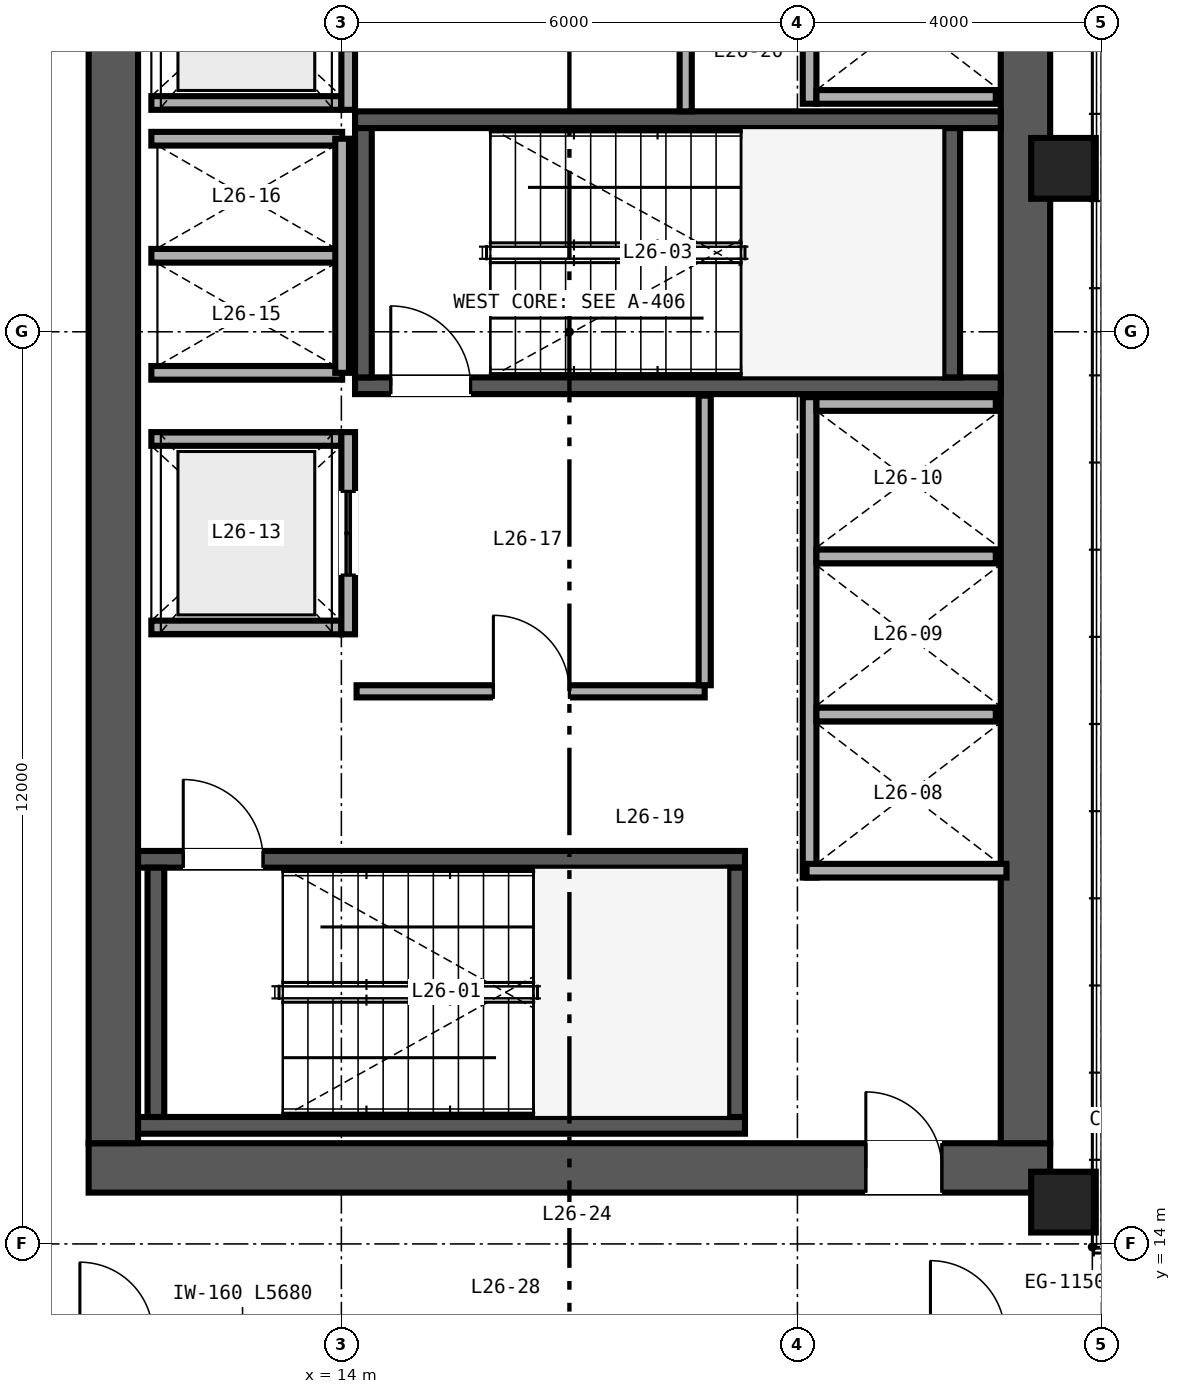
"""IFC4 building model, lengths in metres.
Left out: names, types, materials, properties, quantities, classifications, styles, units other than length and angle.
Written with IfcOpenShell. Run it as: python <this file> out.ifc"""

import sys

from ifc_helpers import new_model, si_unit, direction, frame, frame_2d, origin, origin_2d, place, context, subcontext, project, spatial, rectangle, hollow_rectangle, extrude, source, transform, mapped, element, fill, save


model = new_model("IFC4")
c1 = context("Model", 3, precision=1e-05, world=origin(), true_north=direction((0.0, 1.0)))
c2 = subcontext(c1, "Body", "Model", "MODEL_VIEW")
j1 = project(units=[si_unit("LENGTHUNIT", "METRE"), si_unit("PLANEANGLEUNIT", "RADIAN")], contexts=[c1])
p1 = place(None, origin())
s1 = spatial("IfcSite", under=j1, at=p1, CompositionType="ELEMENT")
p2 = place(p1, origin())
s2 = spatial("IfcBuilding", under=s1, at=p2, CompositionType="ELEMENT")
p3 = place(p2, frame((0.0, 0.0, 108.0)))
s3 = spatial("IfcBuildingStorey", under=s2, at=p3, CompositionType="ELEMENT", Elevation=108.0)
p4 = place(p3, frame((10.675, 15.0, 0.0), z_axis=(0.0, 0.0, 1.0), x_axis=(1.0, 0.0, 0.0)))
e1 = element("IfcWall", 1, at=p4, inside=s3, PredefinedType="SHEAR", context=c2, shape_type="SweptSolid", body=[
    extrude(rectangle(XDim=12.65, YDim=0.65, at=frame_2d((6.325, 0.0))), origin(), (0.0, 0.0, 1.0), 3.36),
])
p5 = place(p4, frame((10.225, 0.0, 0.0)))
e2 = element("IfcOpeningElement", 2, at=p5, cuts=e1, PredefinedType="OPENING", context=c2, shape_type="SweptSolid", body=[
    extrude(rectangle(XDim=1.0, YDim=2.15, at=frame_2d((0.5, 1.075))), frame((0.0, 0.335, 0.0), z_axis=(0.0, -1.0, 0.0), x_axis=(1.0, 0.0, 0.0)), (0.0, 0.0, 1.0), 0.67),
])
for number, where, z_axis, x_axis in (
    (3, (11.0, 15.325, 0.0), (0.0, 0.0, 1.0), (0.0, 1.0, 0.0)),
    (4, (23.0, 15.325, 0.0), (0.0, 0.0, 1.0), (0.0, 1.0, 0.0)),
):
    element("IfcWall", number, at=place(p3, frame(where, z_axis=z_axis, x_axis=x_axis)), inside=s3, PredefinedType="SHEAR", context=c2, shape_type="SweptSolid", body=[
        extrude(rectangle(XDim=21.35, YDim=0.65, at=frame_2d((10.675, 0.0))), origin(), (0.0, 0.0, 1.0), 3.36),
    ])
p6 = place(p3, frame((11.325, 15.56, 0.0), z_axis=(0.0, 0.0, 1.0), x_axis=(1.0, 0.0, 0.0)))
e5 = element("IfcWall", 5, at=p6, inside=s3, PredefinedType="SHEAR", context=c2, shape_type="SweptSolid", body=[
    extrude(rectangle(XDim=7.985, YDim=0.22, at=frame_2d((3.993, 0.0))), origin(), (0.0, 0.0, 1.0), 3.4),
])
p7 = place(p3, frame((11.325, 19.06, 0.0), z_axis=(0.0, 0.0, 1.0), x_axis=(1.0, 0.0, 0.0)))
e6 = element("IfcWall", 6, at=p7, inside=s3, PredefinedType="SHEAR", context=c2, shape_type="SweptSolid", body=[
    extrude(rectangle(XDim=7.985, YDim=0.22, at=frame_2d((3.993, 0.0))), origin(), (0.0, 0.0, 1.0), 3.4),
])
p8 = place(p7, frame((0.595, 0.0, 0.0)))
e7 = element("IfcOpeningElement", 7, at=p8, cuts=e6, PredefinedType="OPENING", context=c2, shape_type="SweptSolid", body=[
    extrude(rectangle(XDim=1.05, YDim=2.15, at=frame_2d((0.525, 1.075))), frame((0.0, 0.12, 0.0), z_axis=(0.0, -1.0, 0.0), x_axis=(1.0, 0.0, 0.0)), (0.0, 0.0, 1.0), 0.24),
])
for number, where, z_axis, x_axis in (
    (8, (11.56, 15.67, 0.0), (0.0, 0.0, 1.0), (0.0, 1.0, 0.0)),
    (9, (19.2, 15.67, 0.0), (0.0, 0.0, 1.0), (0.0, 1.0, 0.0)),
):
    element("IfcWall", number, at=place(p3, frame(where, z_axis=z_axis, x_axis=x_axis)), inside=s3, PredefinedType="SHEAR", context=c2, shape_type="SweptSolid", body=[
        extrude(rectangle(XDim=3.28, YDim=0.22, at=frame_2d((1.64, 0.0))), origin(), (0.0, 0.0, 1.0), 3.4),
    ])
p9 = place(p3, frame((14.18, 25.29, 0.0), z_axis=(0.0, 0.0, 1.0), x_axis=(1.0, 0.0, 0.0)))
e10 = element("IfcWall", 10, at=p9, inside=s3, PredefinedType="SHEAR", context=c2, shape_type="SweptSolid", body=[
    extrude(rectangle(XDim=8.495, YDim=0.22, at=frame_2d((4.248, 0.0))), origin(), (0.0, 0.0, 1.0), 3.4),
])
p10 = place(p9, frame((0.47, 0.0, 0.0)))
e11 = element("IfcOpeningElement", 11, at=p10, cuts=e10, PredefinedType="OPENING", context=c2, shape_type="SweptSolid", body=[
    extrude(rectangle(XDim=1.05, YDim=2.15, at=frame_2d((0.525, 1.075))), frame((0.0, 0.12, 0.0), z_axis=(0.0, -1.0, 0.0), x_axis=(1.0, 0.0, 0.0)), (0.0, 0.0, 1.0), 0.24),
])
p11 = place(p3, frame((14.18, 28.79, 0.0), z_axis=(0.0, 0.0, 1.0), x_axis=(1.0, 0.0, 0.0)))
e12 = element("IfcWall", 12, at=p11, inside=s3, PredefinedType="SHEAR", context=c2, shape_type="SweptSolid", body=[
    extrude(rectangle(XDim=8.495, YDim=0.22, at=frame_2d((4.248, 0.0))), origin(), (0.0, 0.0, 1.0), 3.4),
])
for number, where, z_axis, x_axis in (
    (13, (14.29, 25.4, 0.0), (0.0, 0.0, 1.0), (0.0, 1.0, 0.0)),
    (14, (22.03, 25.4, 0.0), (0.0, 0.0, 1.0), (0.0, 1.0, 0.0)),
):
    element("IfcWall", number, at=place(p3, frame(where, z_axis=z_axis, x_axis=x_axis)), inside=s3, PredefinedType="SHEAR", context=c2, shape_type="SweptSolid", body=[
        extrude(rectangle(XDim=3.28, YDim=0.22, at=frame_2d((1.64, 0.0))), origin(), (0.0, 0.0, 1.0), 3.4),
    ])
m1 = source(origin(), c2, "Body", "SweptSolid", [
    extrude(hollow_rectangle(XDim=0.85, YDim=0.8, WallThickness=0.032, at=origin_2d()), origin(), (0.0, 0.0, 1.0), 3.36),
])
for number, where, z_axis, x_axis in (
    (15, (23.5, 14.55, 0.0), (0.0, 0.0, 1.0), (1.0, 0.0, 0.0)),
    (16, (23.5, 28.15, 0.0), (0.0, 0.0, 1.0), (1.0, 0.0, 0.0)),
):
    element("IfcColumn", number, at=place(p3, frame(where, z_axis=z_axis, x_axis=x_axis)), inside=s3, PredefinedType="COLUMN", context=c2, shape_type="MappedRepresentation", body=[
        mapped(m1, transform((0.0, 0.0, 0.0), scale=1.0)),
    ])
p12 = place(p3, frame((20.16, 18.82, 0.0), z_axis=(0.0, 0.0, 1.0), x_axis=(0.0, 1.0, 0.0)))
e17 = element("IfcWall", 17, at=p12, inside=s3, PredefinedType="SOLIDWALL", context=c2, shape_type="SweptSolid", body=[
    extrude(rectangle(XDim=6.32, YDim=0.18, at=frame_2d((3.16, 0.0))), origin(), (0.0, 0.0, 1.0), 2.36),
])
p13 = place(p3, frame((20.12, 18.91, 0.0), z_axis=(0.0, 0.0, 1.0), x_axis=(1.0, 0.0, 0.0)))
e18 = element("IfcWall", 18, at=p13, inside=s3, PredefinedType="SOLIDWALL", context=c2, shape_type="SweptSolid", body=[
    extrude(rectangle(XDim=2.63, YDim=0.18, at=frame_2d((1.315, 0.0))), origin(), (0.0, 0.0, 1.0), 3.36),
])
p14 = place(p3, frame((20.25, 25.05, 0.0), z_axis=(0.0, 0.0, 1.0), x_axis=(1.0, 0.0, 0.0)))
e19 = element("IfcWall", 19, at=p14, inside=s3, PredefinedType="SOLIDWALL", context=c2, shape_type="SweptSolid", body=[
    extrude(rectangle(XDim=2.36, YDim=0.18, at=frame_2d((1.18, 0.0))), origin(), (0.0, 0.0, 1.0), 3.36),
])
p15 = place(p3, frame((20.25, 20.965, 0.0), z_axis=(0.0, 0.0, 1.0), x_axis=(1.0, 0.0, 0.0)))
e20 = element("IfcWall", 20, at=p15, inside=s3, PredefinedType="SOLIDWALL", context=c2, shape_type="SweptSolid", body=[
    extrude(rectangle(XDim=2.36, YDim=0.18, at=frame_2d((1.18, 0.0))), origin(), (0.0, 0.0, 1.0), 2.36),
])
p16 = place(p3, frame((20.25, 23.045, 0.0), z_axis=(0.0, 0.0, 1.0), x_axis=(1.0, 0.0, 0.0)))
e21 = element("IfcWall", 21, at=p16, inside=s3, PredefinedType="SOLIDWALL", context=c2, shape_type="SweptSolid", body=[
    extrude(rectangle(XDim=2.36, YDim=0.18, at=frame_2d((1.18, 0.0))), origin(), (0.0, 0.0, 1.0), 3.36),
])
p17 = place(p3, frame((20.16, 29.0, 0.0), z_axis=(0.0, 0.0, 1.0), x_axis=(0.0, 1.0, 0.0)))
e22 = element("IfcWall", 22, at=p17, inside=s3, PredefinedType="SOLIDWALL", context=c2, shape_type="SweptSolid", body=[
    extrude(rectangle(XDim=4.29, YDim=0.18, at=frame_2d((2.145, 0.0))), origin(), (0.0, 0.0, 1.0), 3.36),
])
p18 = place(p3, frame((20.25, 29.09, 0.0), z_axis=(0.0, 0.0, 1.0), x_axis=(1.0, 0.0, 0.0)))
e23 = element("IfcWall", 23, at=p18, inside=s3, PredefinedType="SOLIDWALL", context=c2, shape_type="SweptSolid", body=[
    extrude(rectangle(XDim=2.36, YDim=0.18, at=frame_2d((1.18, 0.0))), origin(), (0.0, 0.0, 1.0), 3.36),
])
for number, where, z_axis, x_axis in (
    (24, (11.5, 22.11, 0.0), (0.0, 0.0, 1.0), (1.0, 0.0, 0.0)),
    (25, (11.5, 24.59, 0.0), (0.0, 0.0, 1.0), (1.0, 0.0, 0.0)),
):
    element("IfcWall", number, at=place(p3, frame(where, z_axis=z_axis, x_axis=x_axis)), inside=s3, PredefinedType="SOLIDWALL", context=c2, shape_type="SweptSolid", body=[
        extrude(rectangle(XDim=2.5, YDim=0.18, at=frame_2d((1.25, 0.0))), origin(), (0.0, 0.0, 1.0), 3.36),
    ])
p19 = place(p3, frame((14.09, 22.02, 0.0), z_axis=(0.0, 0.0, 1.0), x_axis=(0.0, 1.0, 0.0)))
e26 = element("IfcWall", 26, at=p19, inside=s3, PredefinedType="SOLIDWALL", context=c2, shape_type="SweptSolid", body=[
    extrude(rectangle(XDim=2.66, YDim=0.18, at=frame_2d((1.33, 0.0))), origin(), (0.0, 0.0, 1.0), 3.36),
])
p20 = place(p19, frame((0.78, 0.0, 0.0)))
e27 = element("IfcOpeningElement", 27, at=p20, cuts=e26, PredefinedType="OPENING", context=c2, shape_type="SweptSolid", body=[
    extrude(rectangle(XDim=1.1, YDim=2.2, at=frame_2d((0.55, 1.1))), frame((0.0, 0.1, 0.0), z_axis=(0.0, -1.0, 0.0), x_axis=(1.0, 0.0, 0.0)), (0.0, 0.0, 1.0), 0.2),
])
p21 = place(p3, frame((11.5, 29.01, 0.0), z_axis=(0.0, 0.0, 1.0), x_axis=(1.0, 0.0, 0.0)))
e28 = element("IfcWall", 28, at=p21, inside=s3, PredefinedType="SOLIDWALL", context=c2, shape_type="SweptSolid", body=[
    extrude(rectangle(XDim=2.5, YDim=0.18, at=frame_2d((1.25, 0.0))), origin(), (0.0, 0.0, 1.0), 3.36),
])
p22 = place(p3, frame((14.09, 28.92, 0.0), z_axis=(0.0, 0.0, 1.0), x_axis=(0.0, 1.0, 0.0)))
e29 = element("IfcWall", 29, at=p22, inside=s3, PredefinedType="SOLIDWALL", context=c2, shape_type="SweptSolid", body=[
    extrude(rectangle(XDim=2.66, YDim=0.18, at=frame_2d((1.33, 0.0))), origin(), (0.0, 0.0, 1.0), 3.36),
])
p23 = place(p22, frame((0.78, 0.0, 0.0)))
e30 = element("IfcOpeningElement", 30, at=p23, cuts=e29, PredefinedType="OPENING", context=c2, shape_type="SweptSolid", body=[
    extrude(rectangle(XDim=1.1, YDim=2.2, at=frame_2d((0.55, 1.1))), frame((0.0, 0.1, 0.0), z_axis=(0.0, -1.0, 0.0), x_axis=(1.0, 0.0, 0.0)), (0.0, 0.0, 1.0), 0.2),
])
for number, where, z_axis, x_axis in (
    (31, (11.5, 25.46, 0.0), (0.0, 0.0, 1.0), (1.0, 0.0, 0.0)),
    (32, (11.5, 27.0, 0.0), (0.0, 0.0, 1.0), (1.0, 0.0, 0.0)),
    (33, (11.5, 28.54, 0.0), (0.0, 0.0, 1.0), (1.0, 0.0, 0.0)),
):
    element("IfcWall", number, at=place(p3, frame(where, z_axis=z_axis, x_axis=x_axis)), inside=s3, PredefinedType="SOLIDWALL", context=c2, shape_type="SweptSolid", body=[
        extrude(rectangle(XDim=2.51, YDim=0.18, at=frame_2d((1.255, 0.0))), origin(), (0.0, 0.0, 1.0), 3.36),
    ])
p24 = place(p3, frame((14.01, 25.46, 0.0), z_axis=(0.0, 0.0, 1.0), x_axis=(0.0, 1.0, 0.0)))
e34 = element("IfcWall", 34, at=p24, inside=s3, PredefinedType="SOLIDWALL", context=c2, shape_type="SweptSolid", body=[
    extrude(rectangle(XDim=3.08, YDim=0.18, at=frame_2d((1.54, 0.0))), origin(), (0.0, 0.0, 1.0), 3.36),
])
p25 = place(p3, frame((14.2, 21.27, 0.0), z_axis=(0.0, 0.0, 1.0), x_axis=(1.0, 0.0, 0.0)))
e35 = element("IfcWall", 35, at=p25, inside=s3, PredefinedType="PARTITIONING", context=c2, shape_type="SweptSolid", body=[
    extrude(rectangle(XDim=4.58, YDim=0.16, at=frame_2d((2.29, 0.0))), origin(), (0.0, 0.0, 1.0), 3.36),
])
p26 = place(p25, frame((1.8, 0.0, 0.0)))
e36 = element("IfcOpeningElement", 36, at=p26, cuts=e35, PredefinedType="OPENING", context=c2, shape_type="SweptSolid", body=[
    extrude(rectangle(XDim=1.0, YDim=2.15, at=frame_2d((0.5, 1.075))), frame((0.0, 0.09, 0.0), z_axis=(0.0, -1.0, 0.0), x_axis=(1.0, 0.0, 0.0)), (0.0, 0.0, 1.0), 0.18),
])
p27 = place(p3, frame((18.78, 21.35, 0.0), z_axis=(0.0, 0.0, 1.0), x_axis=(0.0, 1.0, 0.0)))
e37 = element("IfcWall", 37, at=p27, inside=s3, PredefinedType="PARTITIONING", context=c2, shape_type="SweptSolid", body=[
    extrude(rectangle(XDim=3.81, YDim=0.16, at=frame_2d((1.905, 0.0))), origin(), (0.0, 0.0, 1.0), 3.36),
])
p28 = place(p3, frame((18.53, 28.9, 0.0), z_axis=(0.0, 0.0, 1.0), x_axis=(0.0, 1.0, 0.0)))
e38 = element("IfcWall", 38, at=p28, inside=s3, PredefinedType="PARTITIONING", context=c2, shape_type="SweptSolid", body=[
    extrude(rectangle(XDim=3.9, YDim=0.16, at=frame_2d((1.95, 0.0))), origin(), (0.0, 0.0, 1.0), 3.36),
])
p29 = place(p28, frame((1.5, 0.0, 0.0)))
e39 = element("IfcOpeningElement", 39, at=p29, cuts=e38, PredefinedType="OPENING", context=c2, shape_type="SweptSolid", body=[
    extrude(rectangle(XDim=1.0, YDim=2.15, at=frame_2d((0.5, 1.075))), frame((0.0, 0.09, 0.0), z_axis=(0.0, -1.0, 0.0), x_axis=(1.0, 0.0, 0.0)), (0.0, 0.0, 1.0), 0.18),
])
m2 = source(origin(), c2, "Body", "SweptSolid", [
    extrude(rectangle(XDim=1.05, YDim=2.15, at=frame_2d((0.525, 1.075))), frame((0.0, 0.025, 0.0), z_axis=(0.0, -1.0, 0.0), x_axis=(1.0, 0.0, 0.0)), (0.0, 0.0, 1.0), 0.05),
])
p30 = place(p8, origin())
e40 = element("IfcDoor", 40, at=p30, inside=s3, OperationType="SINGLE_SWING_LEFT", PredefinedType="DOOR", context=c2, shape_type="MappedRepresentation", body=[
    mapped(m2, transform((0.0, 0.0, 0.0), scale=1.0)),
])
fill(e7, e40)
p31 = place(p10, origin())
e41 = element("IfcDoor", 41, at=p31, inside=s3, OperationType="SINGLE_SWING_LEFT", PredefinedType="DOOR", context=c2, shape_type="MappedRepresentation", body=[
    mapped(m2, transform((0.0, 0.0, 0.0), scale=1.0)),
])
fill(e11, e41)
m3 = source(origin(), c2, "Body", "SweptSolid", [
    extrude(rectangle(XDim=1.1, YDim=2.2, at=frame_2d((0.55, 1.1))), frame((0.0, 0.025, 0.0), z_axis=(0.0, -1.0, 0.0), x_axis=(1.0, 0.0, 0.0)), (0.0, 0.0, 1.0), 0.05),
])
p32 = place(p20, origin())
e42 = element("IfcDoor", 42, at=p32, inside=s3, OperationType="DOUBLE_DOOR_SLIDING", PredefinedType="DOOR", context=c2, shape_type="MappedRepresentation", body=[
    mapped(m3, transform((0.0, 0.0, 0.0), scale=1.0)),
])
fill(e27, e42)
m4 = source(origin(), c2, "Body", "SweptSolid", [
    extrude(rectangle(XDim=1.0, YDim=2.15, at=frame_2d((0.5, 1.075))), frame((0.0, 0.025, 0.0), z_axis=(0.0, -1.0, 0.0), x_axis=(1.0, 0.0, 0.0)), (0.0, 0.0, 1.0), 0.05),
])
p33 = place(p26, origin())
e43 = element("IfcDoor", 43, at=p33, inside=s3, OperationType="SINGLE_SWING_LEFT", PredefinedType="DOOR", context=c2, shape_type="MappedRepresentation", body=[
    mapped(m4, transform((0.0, 0.0, 0.0), scale=1.0)),
])
fill(e36, e43)
p34 = place(p5, origin())
e44 = element("IfcDoor", 44, at=p34, inside=s3, OperationType="SINGLE_SWING_LEFT", PredefinedType="DOOR", context=c2, shape_type="MappedRepresentation", body=[
    mapped(m4, transform((0.0, 0.0, 0.0), scale=1.0)),
])
fill(e2, e44)
save(model, sys.argv[1])
